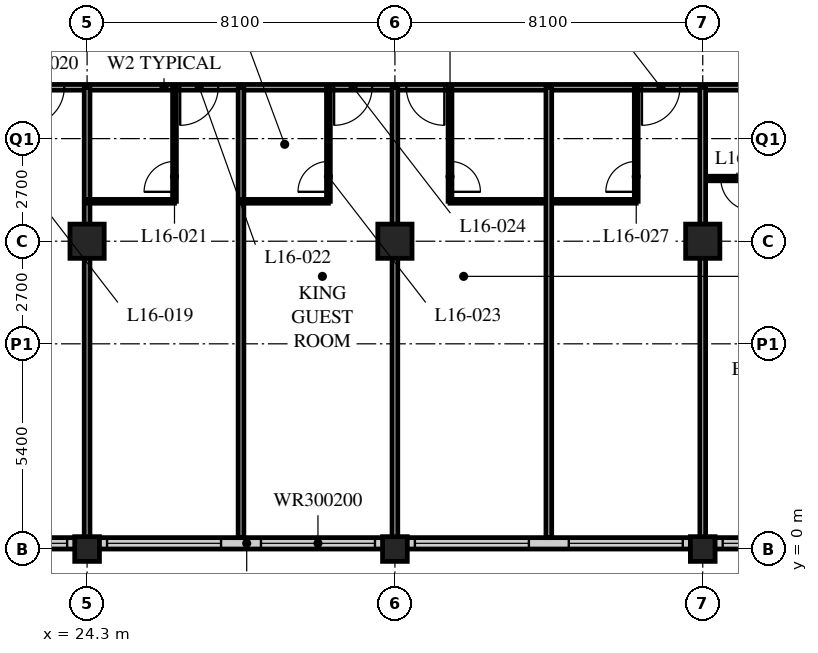
"""IFC4 building model, lengths in metres.
Left out: names, types, materials, properties, quantities, classifications, styles, units other than length and angle.
Written with IfcOpenShell. Run it as: python <this file> out.ifc"""

import sys

from ifc_helpers import new_model, si_unit, direction, frame, frame_2d, origin, origin_2d, place, context, subcontext, project, spatial, rectangle, hollow_rectangle, extrude, element, fill, save


model = new_model("IFC4")
c1 = context("Model", 3, precision=1e-05, world=origin(), true_north=direction((0.0, 1.0)))
c2 = subcontext(c1, "Body", "Model", "MODEL_VIEW")
j1 = project(units=[si_unit("LENGTHUNIT", "METRE"), si_unit("PLANEANGLEUNIT", "RADIAN")], contexts=[c1])
p1 = place(None, origin())
s1 = spatial("IfcSite", under=j1, at=p1, CompositionType="ELEMENT")
p2 = place(p1, origin())
s2 = spatial("IfcBuilding", under=s1, at=p2, CompositionType="ELEMENT")
p3 = place(p2, frame((0.0, 0.0, 67.0)))
s3 = spatial("IfcBuildingStorey", under=s2, at=p3, CompositionType="ELEMENT", Elevation=67.0)
p4 = place(p3, frame((24.3, 0.0, 0.0), z_axis=(0.0, 0.0, 1.0), x_axis=(1.0, 0.0, 0.0)))
e1 = element("IfcColumn", 1, at=p4, inside=s3, PredefinedType="COLUMN", context=c2, shape_type="SweptSolid", body=[
    extrude(hollow_rectangle(XDim=0.65, YDim=0.65, WallThickness=0.05, at=origin_2d()), origin(), (0.0, 0.0, 1.0), 3.4),
])
p5 = place(p3, frame((24.3, 8.1, 0.0), z_axis=(0.0, 0.0, 1.0), x_axis=(1.0, 0.0, 0.0)))
e2 = element("IfcColumn", 2, at=p5, inside=s3, PredefinedType="COLUMN", context=c2, shape_type="SweptSolid", body=[
    extrude(hollow_rectangle(XDim=0.9, YDim=0.9, WallThickness=0.09, at=origin_2d()), origin(), (0.0, 0.0, 1.0), 3.4),
])
p6 = place(p3, frame((32.4, 0.0, 0.0), z_axis=(0.0, 0.0, 1.0), x_axis=(1.0, 0.0, 0.0)))
e3 = element("IfcColumn", 3, at=p6, inside=s3, PredefinedType="COLUMN", context=c2, shape_type="SweptSolid", body=[
    extrude(hollow_rectangle(XDim=0.65, YDim=0.65, WallThickness=0.05, at=origin_2d()), origin(), (0.0, 0.0, 1.0), 3.4),
])
p7 = place(p3, frame((32.4, 8.1, 0.0), z_axis=(0.0, 0.0, 1.0), x_axis=(1.0, 0.0, 0.0)))
e4 = element("IfcColumn", 4, at=p7, inside=s3, PredefinedType="COLUMN", context=c2, shape_type="SweptSolid", body=[
    extrude(hollow_rectangle(XDim=0.9, YDim=0.9, WallThickness=0.09, at=origin_2d()), origin(), (0.0, 0.0, 1.0), 3.4),
])
p8 = place(p3, frame((40.5, 0.0, 0.0), z_axis=(0.0, 0.0, 1.0), x_axis=(1.0, 0.0, 0.0)))
e5 = element("IfcColumn", 5, at=p8, inside=s3, PredefinedType="COLUMN", context=c2, shape_type="SweptSolid", body=[
    extrude(hollow_rectangle(XDim=0.65, YDim=0.65, WallThickness=0.05, at=origin_2d()), origin(), (0.0, 0.0, 1.0), 3.4),
])
p9 = place(p3, frame((40.5, 8.1, 0.0), z_axis=(0.0, 0.0, 1.0), x_axis=(1.0, 0.0, 0.0)))
e6 = element("IfcColumn", 6, at=p9, inside=s3, PredefinedType="COLUMN", context=c2, shape_type="SweptSolid", body=[
    extrude(hollow_rectangle(XDim=0.9, YDim=0.9, WallThickness=0.09, at=origin_2d()), origin(), (0.0, 0.0, 1.0), 3.4),
])
p10 = place(p3, frame((8.4, 0.15, 0.0), z_axis=(0.0, 0.0, 1.0), x_axis=(1.0, 0.0, 0.0)))
e7 = element("IfcWall", 7, at=p10, inside=s3, PredefinedType="SOLIDWALL", context=c2, shape_type="SweptSolid", body=[
    extrude(rectangle(XDim=40.2, YDim=0.3, at=frame_2d((20.1, 0.0))), origin(), (0.0, 0.0, 1.0), 3.19),
])
p11 = place(p10, frame((0.225, 0.0, 0.9)))
e8 = element("IfcOpeningElement", 8, at=p11, cuts=e7, PredefinedType="OPENING", context=c2, shape_type="SweptSolid", body=[
    extrude(rectangle(XDim=3.0, YDim=2.0, at=frame_2d((1.5, 1.0))), frame((0.0, 0.16, 0.0), z_axis=(0.0, -1.0, 0.0), x_axis=(1.0, 0.0, 0.0)), (0.0, 0.0, 1.0), 0.32),
])
p12 = place(p10, frame((4.275, 0.0, 0.9)))
e9 = element("IfcOpeningElement", 9, at=p12, cuts=e7, PredefinedType="OPENING", context=c2, shape_type="SweptSolid", body=[
    extrude(rectangle(XDim=3.0, YDim=2.0, at=frame_2d((1.5, 1.0))), frame((0.0, 0.16, 0.0), z_axis=(0.0, -1.0, 0.0), x_axis=(1.0, 0.0, 0.0)), (0.0, 0.0, 1.0), 0.32),
])
p13 = place(p10, frame((8.325, 0.0, 0.9)))
e10 = element("IfcOpeningElement", 10, at=p13, cuts=e7, PredefinedType="OPENING", context=c2, shape_type="SweptSolid", body=[
    extrude(rectangle(XDim=3.0, YDim=2.0, at=frame_2d((1.5, 1.0))), frame((0.0, 0.16, 0.0), z_axis=(0.0, -1.0, 0.0), x_axis=(1.0, 0.0, 0.0)), (0.0, 0.0, 1.0), 0.32),
])
p14 = place(p10, frame((12.375, 0.0, 0.9)))
e11 = element("IfcOpeningElement", 11, at=p14, cuts=e7, PredefinedType="OPENING", context=c2, shape_type="SweptSolid", body=[
    extrude(rectangle(XDim=3.0, YDim=2.0, at=frame_2d((1.5, 1.0))), frame((0.0, 0.16, 0.0), z_axis=(0.0, -1.0, 0.0), x_axis=(1.0, 0.0, 0.0)), (0.0, 0.0, 1.0), 0.32),
])
p15 = place(p10, frame((16.425, 0.0, 0.9)))
e12 = element("IfcOpeningElement", 12, at=p15, cuts=e7, PredefinedType="OPENING", context=c2, shape_type="SweptSolid", body=[
    extrude(rectangle(XDim=3.0, YDim=2.0, at=frame_2d((1.5, 1.0))), frame((0.0, 0.16, 0.0), z_axis=(0.0, -1.0, 0.0), x_axis=(1.0, 0.0, 0.0)), (0.0, 0.0, 1.0), 0.32),
])
p16 = place(p10, frame((20.475, 0.0, 0.9)))
e13 = element("IfcOpeningElement", 13, at=p16, cuts=e7, PredefinedType="OPENING", context=c2, shape_type="SweptSolid", body=[
    extrude(rectangle(XDim=3.0, YDim=2.0, at=frame_2d((1.5, 1.0))), frame((0.0, 0.16, 0.0), z_axis=(0.0, -1.0, 0.0), x_axis=(1.0, 0.0, 0.0)), (0.0, 0.0, 1.0), 0.32),
])
p17 = place(p10, frame((24.525, 0.0, 0.9)))
e14 = element("IfcOpeningElement", 14, at=p17, cuts=e7, PredefinedType="OPENING", context=c2, shape_type="SweptSolid", body=[
    extrude(rectangle(XDim=3.0, YDim=2.0, at=frame_2d((1.5, 1.0))), frame((0.0, 0.16, 0.0), z_axis=(0.0, -1.0, 0.0), x_axis=(1.0, 0.0, 0.0)), (0.0, 0.0, 1.0), 0.32),
])
p18 = place(p10, frame((28.575, 0.0, 0.9)))
e15 = element("IfcOpeningElement", 15, at=p18, cuts=e7, PredefinedType="OPENING", context=c2, shape_type="SweptSolid", body=[
    extrude(rectangle(XDim=3.0, YDim=2.0, at=frame_2d((1.5, 1.0))), frame((0.0, 0.16, 0.0), z_axis=(0.0, -1.0, 0.0), x_axis=(1.0, 0.0, 0.0)), (0.0, 0.0, 1.0), 0.32),
])
p19 = place(p10, frame((32.625, 0.0, 0.9)))
e16 = element("IfcOpeningElement", 16, at=p19, cuts=e7, PredefinedType="OPENING", context=c2, shape_type="SweptSolid", body=[
    extrude(rectangle(XDim=3.0, YDim=2.0, at=frame_2d((1.5, 1.0))), frame((0.0, 0.16, 0.0), z_axis=(0.0, -1.0, 0.0), x_axis=(1.0, 0.0, 0.0)), (0.0, 0.0, 1.0), 0.32),
])
p20 = place(p10, frame((36.675, 0.0, 0.9)))
e17 = element("IfcOpeningElement", 17, at=p20, cuts=e7, PredefinedType="OPENING", context=c2, shape_type="SweptSolid", body=[
    extrude(rectangle(XDim=3.0, YDim=2.0, at=frame_2d((1.5, 1.0))), frame((0.0, 0.16, 0.0), z_axis=(0.0, -1.0, 0.0), x_axis=(1.0, 0.0, 0.0)), (0.0, 0.0, 1.0), 0.32),
])
p21 = place(p3, frame((8.1, 12.15, 0.0), z_axis=(0.0, 0.0, 1.0), x_axis=(1.0, 0.0, 0.0)))
e18 = element("IfcWall", 18, at=p21, inside=s3, PredefinedType="PARTITIONING", context=c2, shape_type="SweptSolid", body=[
    extrude(rectangle(XDim=36.45, YDim=0.15, at=frame_2d((18.225, 0.0))), origin(), (0.0, 0.0, 1.0), 3.19),
])
p22 = place(p21, frame((4.35, 0.0, 0.0)))
e19 = element("IfcOpeningElement", 19, at=p22, cuts=e18, PredefinedType="OPENING", context=c2, shape_type="SweptSolid", body=[
    extrude(rectangle(XDim=1.0, YDim=2.1, at=frame_2d((0.5, 1.05))), frame((0.0, 0.085, 0.0), z_axis=(0.0, -1.0, 0.0), x_axis=(1.0, 0.0, 0.0)), (0.0, 0.0, 1.0), 0.17),
])
p23 = place(p21, frame((10.55, 0.0, 0.0)))
e20 = element("IfcOpeningElement", 20, at=p23, cuts=e18, PredefinedType="OPENING", context=c2, shape_type="SweptSolid", body=[
    extrude(rectangle(XDim=1.0, YDim=2.1, at=frame_2d((0.5, 1.05))), frame((0.0, 0.085, 0.0), z_axis=(0.0, -1.0, 0.0), x_axis=(1.0, 0.0, 0.0)), (0.0, 0.0, 1.0), 0.17),
])
p24 = place(p21, frame((14.6, 0.0, 0.0)))
e21 = element("IfcOpeningElement", 21, at=p24, cuts=e18, PredefinedType="OPENING", context=c2, shape_type="SweptSolid", body=[
    extrude(rectangle(XDim=1.0, YDim=2.1, at=frame_2d((0.5, 1.05))), frame((0.0, 0.085, 0.0), z_axis=(0.0, -1.0, 0.0), x_axis=(1.0, 0.0, 0.0)), (0.0, 0.0, 1.0), 0.17),
])
p25 = place(p21, frame((18.65, 0.0, 0.0)))
e22 = element("IfcOpeningElement", 22, at=p25, cuts=e18, PredefinedType="OPENING", context=c2, shape_type="SweptSolid", body=[
    extrude(rectangle(XDim=1.0, YDim=2.1, at=frame_2d((0.5, 1.05))), frame((0.0, 0.085, 0.0), z_axis=(0.0, -1.0, 0.0), x_axis=(1.0, 0.0, 0.0)), (0.0, 0.0, 1.0), 0.17),
])
p26 = place(p21, frame((22.7, 0.0, 0.0)))
e23 = element("IfcOpeningElement", 23, at=p26, cuts=e18, PredefinedType="OPENING", context=c2, shape_type="SweptSolid", body=[
    extrude(rectangle(XDim=1.0, YDim=2.1, at=frame_2d((0.5, 1.05))), frame((0.0, 0.085, 0.0), z_axis=(0.0, -1.0, 0.0), x_axis=(1.0, 0.0, 0.0)), (0.0, 0.0, 1.0), 0.17),
])
p27 = place(p21, frame((24.6, 0.0, 0.0)))
e24 = element("IfcOpeningElement", 24, at=p27, cuts=e18, PredefinedType="OPENING", context=c2, shape_type="SweptSolid", body=[
    extrude(rectangle(XDim=1.0, YDim=2.1, at=frame_2d((0.5, 1.05))), frame((0.0, 0.085, 0.0), z_axis=(0.0, -1.0, 0.0), x_axis=(1.0, 0.0, 0.0)), (0.0, 0.0, 1.0), 0.17),
])
p28 = place(p21, frame((30.8, 0.0, 0.0)))
e25 = element("IfcOpeningElement", 25, at=p28, cuts=e18, PredefinedType="OPENING", context=c2, shape_type="SweptSolid", body=[
    extrude(rectangle(XDim=1.0, YDim=2.1, at=frame_2d((0.5, 1.05))), frame((0.0, 0.085, 0.0), z_axis=(0.0, -1.0, 0.0), x_axis=(1.0, 0.0, 0.0)), (0.0, 0.0, 1.0), 0.17),
])
p29 = place(p21, frame((1.525, 0.0, 0.0)))
e26 = element("IfcOpeningElement", 26, at=p29, cuts=e18, PredefinedType="OPENING", context=c2, shape_type="SweptSolid", body=[
    extrude(rectangle(XDim=1.0, YDim=2.1, at=frame_2d((0.5, 1.05))), frame((0.0, 0.085, 0.0), z_axis=(0.0, -1.0, 0.0), x_axis=(1.0, 0.0, 0.0)), (0.0, 0.0, 1.0), 0.17),
])
p30 = place(p21, frame((33.925, 0.0, 0.0)))
e27 = element("IfcOpeningElement", 27, at=p30, cuts=e18, PredefinedType="OPENING", context=c2, shape_type="SweptSolid", body=[
    extrude(rectangle(XDim=1.0, YDim=2.1, at=frame_2d((0.5, 1.05))), frame((0.0, 0.085, 0.0), z_axis=(0.0, -1.0, 0.0), x_axis=(1.0, 0.0, 0.0)), (0.0, 0.0, 1.0), 0.17),
])
p31 = place(p3, frame((24.3, 12.15, 0.0), z_axis=(0.0, 0.0, 1.0), x_axis=(0.0, -1.0, 0.0)))
e28 = element("IfcWall", 28, at=p31, inside=s3, PredefinedType="PARTITIONING", context=c2, shape_type="SweptSolid", body=[
    extrude(rectangle(XDim=11.85, YDim=0.15, at=frame_2d((5.925, 0.0))), origin(), (0.0, 0.0, 1.0), 2.578),
])
p32 = place(p3, frame((24.3, 9.15, 0.0), z_axis=(0.0, 0.0, 1.0), x_axis=(1.0, 0.0, 0.0)))
e29 = element("IfcWall", 29, at=p32, inside=s3, PredefinedType="PARTITIONING", context=c2, shape_type="SweptSolid", body=[
    extrude(rectangle(XDim=2.3, YDim=0.1, at=frame_2d((1.15, 0.0))), origin(), (0.0, 0.0, 1.0), 3.19),
])
p33 = place(p3, frame((26.6, 12.15, 0.0), z_axis=(0.0, 0.0, 1.0), x_axis=(0.0, -1.0, 0.0)))
e30 = element("IfcWall", 30, at=p33, inside=s3, PredefinedType="PARTITIONING", context=c2, shape_type="SweptSolid", body=[
    extrude(rectangle(XDim=3.0, YDim=0.1, at=frame_2d((1.5, 0.0))), origin(), (0.0, 0.0, 1.0), 3.19),
])
p34 = place(p33, frame((1.95, 0.0, 0.0)))
e31 = element("IfcOpeningElement", 31, at=p34, cuts=e30, PredefinedType="OPENING", context=c2, shape_type="SweptSolid", body=[
    extrude(rectangle(XDim=0.8, YDim=2.1, at=frame_2d((0.4, 1.05))), frame((0.0, 0.06, 0.0), z_axis=(0.0, -1.0, 0.0), x_axis=(1.0, 0.0, 0.0)), (0.0, 0.0, 1.0), 0.12),
])
p35 = place(p3, frame((28.35, 12.15, 0.0), z_axis=(0.0, 0.0, 1.0), x_axis=(0.0, -1.0, 0.0)))
e32 = element("IfcWall", 32, at=p35, inside=s3, PredefinedType="PARTITIONING", context=c2, shape_type="SweptSolid", body=[
    extrude(rectangle(XDim=11.85, YDim=0.15, at=frame_2d((5.925, 0.0))), origin(), (0.0, 0.0, 1.0), 3.19),
])
p36 = place(p3, frame((28.35, 9.15, 0.0), z_axis=(0.0, 0.0, 1.0), x_axis=(1.0, 0.0, 0.0)))
e33 = element("IfcWall", 33, at=p36, inside=s3, PredefinedType="PARTITIONING", context=c2, shape_type="SweptSolid", body=[
    extrude(rectangle(XDim=2.3, YDim=0.1, at=frame_2d((1.15, 0.0))), origin(), (0.0, 0.0, 1.0), 3.19),
])
p37 = place(p3, frame((30.65, 12.15, 0.0), z_axis=(0.0, 0.0, 1.0), x_axis=(0.0, -1.0, 0.0)))
e34 = element("IfcWall", 34, at=p37, inside=s3, PredefinedType="PARTITIONING", context=c2, shape_type="SweptSolid", body=[
    extrude(rectangle(XDim=3.0, YDim=0.1, at=frame_2d((1.5, 0.0))), origin(), (0.0, 0.0, 1.0), 3.19),
])
p38 = place(p37, frame((1.95, 0.0, 0.0)))
e35 = element("IfcOpeningElement", 35, at=p38, cuts=e34, PredefinedType="OPENING", context=c2, shape_type="SweptSolid", body=[
    extrude(rectangle(XDim=0.8, YDim=2.1, at=frame_2d((0.4, 1.05))), frame((0.0, 0.06, 0.0), z_axis=(0.0, -1.0, 0.0), x_axis=(1.0, 0.0, 0.0)), (0.0, 0.0, 1.0), 0.12),
])
p39 = place(p3, frame((32.4, 12.15, 0.0), z_axis=(0.0, 0.0, 1.0), x_axis=(0.0, -1.0, 0.0)))
e36 = element("IfcWall", 36, at=p39, inside=s3, PredefinedType="PARTITIONING", context=c2, shape_type="SweptSolid", body=[
    extrude(rectangle(XDim=11.85, YDim=0.15, at=frame_2d((5.925, 0.0))), origin(), (0.0, 0.0, 1.0), 2.578),
])
p40 = place(p3, frame((33.85, 9.15, 0.0), z_axis=(0.0, 0.0, 1.0), x_axis=(1.0, 0.0, 0.0)))
e37 = element("IfcWall", 37, at=p40, inside=s3, PredefinedType="PARTITIONING", context=c2, shape_type="SweptSolid", body=[
    extrude(rectangle(XDim=4.9, YDim=0.1, at=frame_2d((2.45, 0.0))), origin(), (0.0, 0.0, 1.0), 3.19),
])
p41 = place(p3, frame((33.85, 12.15, 0.0), z_axis=(0.0, 0.0, 1.0), x_axis=(0.0, -1.0, 0.0)))
e38 = element("IfcWall", 38, at=p41, inside=s3, PredefinedType="PARTITIONING", context=c2, shape_type="SweptSolid", body=[
    extrude(rectangle(XDim=3.0, YDim=0.1, at=frame_2d((1.5, 0.0))), origin(), (0.0, 0.0, 1.0), 3.19),
])
p42 = place(p41, frame((1.95, 0.0, 0.0)))
e39 = element("IfcOpeningElement", 39, at=p42, cuts=e38, PredefinedType="OPENING", context=c2, shape_type="SweptSolid", body=[
    extrude(rectangle(XDim=0.8, YDim=2.1, at=frame_2d((0.4, 1.05))), frame((0.0, 0.06, 0.0), z_axis=(0.0, -1.0, 0.0), x_axis=(1.0, 0.0, 0.0)), (0.0, 0.0, 1.0), 0.12),
])
p43 = place(p3, frame((36.45, 12.15, 0.0), z_axis=(0.0, 0.0, 1.0), x_axis=(0.0, -1.0, 0.0)))
e40 = element("IfcWall", 40, at=p43, inside=s3, PredefinedType="PARTITIONING", context=c2, shape_type="SweptSolid", body=[
    extrude(rectangle(XDim=11.85, YDim=0.15, at=frame_2d((5.925, 0.0))), origin(), (0.0, 0.0, 1.0), 3.19),
])
p44 = place(p3, frame((38.75, 12.15, 0.0), z_axis=(0.0, 0.0, 1.0), x_axis=(0.0, -1.0, 0.0)))
e41 = element("IfcWall", 41, at=p44, inside=s3, PredefinedType="PARTITIONING", context=c2, shape_type="SweptSolid", body=[
    extrude(rectangle(XDim=3.0, YDim=0.1, at=frame_2d((1.5, 0.0))), origin(), (0.0, 0.0, 1.0), 3.19),
])
p45 = place(p44, frame((1.95, 0.0, 0.0)))
e42 = element("IfcOpeningElement", 42, at=p45, cuts=e41, PredefinedType="OPENING", context=c2, shape_type="SweptSolid", body=[
    extrude(rectangle(XDim=0.8, YDim=2.1, at=frame_2d((0.4, 1.05))), frame((0.0, 0.06, 0.0), z_axis=(0.0, -1.0, 0.0), x_axis=(1.0, 0.0, 0.0)), (0.0, 0.0, 1.0), 0.12),
])
p46 = place(p3, frame((40.5, 9.75, 0.0), z_axis=(0.0, 0.0, 1.0), x_axis=(1.0, 0.0, 0.0)))
e43 = element("IfcWall", 43, at=p46, inside=s3, PredefinedType="PARTITIONING", context=c2, shape_type="SweptSolid", body=[
    extrude(rectangle(XDim=8.05, YDim=0.12, at=frame_2d((4.025, 0.0))), origin(), (0.0, 0.0, 1.0), 3.19),
])
p47 = place(p46, frame((0.475, 0.0, 0.0)))
e44 = element("IfcOpeningElement", 44, at=p47, cuts=e43, PredefinedType="OPENING", context=c2, shape_type="SweptSolid", body=[
    extrude(rectangle(XDim=0.85, YDim=2.1, at=frame_2d((0.425, 1.05))), frame((0.0, 0.07, 0.0), z_axis=(0.0, -1.0, 0.0), x_axis=(1.0, 0.0, 0.0)), (0.0, 0.0, 1.0), 0.14),
])
p48 = place(p46, frame((4.325, 0.0, 0.0)))
e45 = element("IfcOpeningElement", 45, at=p48, cuts=e43, PredefinedType="OPENING", context=c2, shape_type="SweptSolid", body=[
    extrude(rectangle(XDim=0.85, YDim=2.1, at=frame_2d((0.425, 1.05))), frame((0.0, 0.07, 0.0), z_axis=(0.0, -1.0, 0.0), x_axis=(1.0, 0.0, 0.0)), (0.0, 0.0, 1.0), 0.14),
])
p49 = place(p3, frame((40.5, 12.15, 0.0), z_axis=(0.0, 0.0, 1.0), x_axis=(0.0, -1.0, 0.0)))
e46 = element("IfcWall", 46, at=p49, inside=s3, PredefinedType="PARTITIONING", context=c2, shape_type="SweptSolid", body=[
    extrude(rectangle(XDim=11.85, YDim=0.15, at=frame_2d((5.925, 0.0))), origin(), (0.0, 0.0, 1.0), 2.578),
])
p50 = place(p14, origin())
e47 = element("IfcWindow", 47, at=p50, inside=s3, PartitioningType="SINGLE_PANEL", PredefinedType="WINDOW", context=c2, shape_type="SweptSolid", body=[
    extrude(rectangle(XDim=3.0, YDim=2.0, at=frame_2d((1.5, 1.0))), frame((0.0, 0.03, 0.0), z_axis=(0.0, -1.0, 0.0), x_axis=(1.0, 0.0, 0.0)), (0.0, 0.0, 1.0), 0.06),
])
fill(e11, e47)
p51 = place(p15, origin())
e48 = element("IfcWindow", 48, at=p51, inside=s3, PartitioningType="SINGLE_PANEL", PredefinedType="WINDOW", context=c2, shape_type="SweptSolid", body=[
    extrude(rectangle(XDim=3.0, YDim=2.0, at=frame_2d((1.5, 1.0))), frame((0.0, 0.03, 0.0), z_axis=(0.0, -1.0, 0.0), x_axis=(1.0, 0.0, 0.0)), (0.0, 0.0, 1.0), 0.06),
])
fill(e12, e48)
p52 = place(p16, origin())
e49 = element("IfcWindow", 49, at=p52, inside=s3, PartitioningType="SINGLE_PANEL", PredefinedType="WINDOW", context=c2, shape_type="SweptSolid", body=[
    extrude(rectangle(XDim=3.0, YDim=2.0, at=frame_2d((1.5, 1.0))), frame((0.0, 0.03, 0.0), z_axis=(0.0, -1.0, 0.0), x_axis=(1.0, 0.0, 0.0)), (0.0, 0.0, 1.0), 0.06),
])
fill(e13, e49)
p53 = place(p17, origin())
e50 = element("IfcWindow", 50, at=p53, inside=s3, PartitioningType="SINGLE_PANEL", PredefinedType="WINDOW", context=c2, shape_type="SweptSolid", body=[
    extrude(rectangle(XDim=3.0, YDim=2.0, at=frame_2d((1.5, 1.0))), frame((0.0, 0.03, 0.0), z_axis=(0.0, -1.0, 0.0), x_axis=(1.0, 0.0, 0.0)), (0.0, 0.0, 1.0), 0.06),
])
fill(e14, e50)
p54 = place(p18, origin())
e51 = element("IfcWindow", 51, at=p54, inside=s3, PartitioningType="SINGLE_PANEL", PredefinedType="WINDOW", context=c2, shape_type="SweptSolid", body=[
    extrude(rectangle(XDim=3.0, YDim=2.0, at=frame_2d((1.5, 1.0))), frame((0.0, 0.03, 0.0), z_axis=(0.0, -1.0, 0.0), x_axis=(1.0, 0.0, 0.0)), (0.0, 0.0, 1.0), 0.06),
])
fill(e15, e51)
p55 = place(p19, origin())
e52 = element("IfcWindow", 52, at=p55, inside=s3, PartitioningType="SINGLE_PANEL", PredefinedType="WINDOW", context=c2, shape_type="SweptSolid", body=[
    extrude(rectangle(XDim=3.0, YDim=2.0, at=frame_2d((1.5, 1.0))), frame((0.0, 0.03, 0.0), z_axis=(0.0, -1.0, 0.0), x_axis=(1.0, 0.0, 0.0)), (0.0, 0.0, 1.0), 0.06),
])
fill(e16, e52)
p56 = place(p24, origin())
e53 = element("IfcDoor", 53, at=p56, inside=s3, OperationType="SINGLE_SWING_RIGHT", PredefinedType="DOOR", context=c2, shape_type="SweptSolid", body=[
    extrude(rectangle(XDim=1.0, YDim=2.1, at=frame_2d((0.5, 1.05))), frame((0.0, 0.025, 0.0), z_axis=(0.0, -1.0, 0.0), x_axis=(1.0, 0.0, 0.0)), (0.0, 0.0, 1.0), 0.05),
])
fill(e21, e53)
p57 = place(p34, origin())
e54 = element("IfcDoor", 54, at=p57, inside=s3, OperationType="SINGLE_SWING_LEFT", PredefinedType="DOOR", context=c2, shape_type="SweptSolid", body=[
    extrude(rectangle(XDim=0.8, YDim=2.1, at=frame_2d((0.4, 1.05))), frame((0.0, 0.025, 0.0), z_axis=(0.0, -1.0, 0.0), x_axis=(1.0, 0.0, 0.0)), (0.0, 0.0, 1.0), 0.05),
])
fill(e31, e54)
p58 = place(p25, origin())
e55 = element("IfcDoor", 55, at=p58, inside=s3, OperationType="SINGLE_SWING_RIGHT", PredefinedType="DOOR", context=c2, shape_type="SweptSolid", body=[
    extrude(rectangle(XDim=1.0, YDim=2.1, at=frame_2d((0.5, 1.05))), frame((0.0, 0.025, 0.0), z_axis=(0.0, -1.0, 0.0), x_axis=(1.0, 0.0, 0.0)), (0.0, 0.0, 1.0), 0.05),
])
fill(e22, e55)
p59 = place(p38, origin())
e56 = element("IfcDoor", 56, at=p59, inside=s3, OperationType="SINGLE_SWING_LEFT", PredefinedType="DOOR", context=c2, shape_type="SweptSolid", body=[
    extrude(rectangle(XDim=0.8, YDim=2.1, at=frame_2d((0.4, 1.05))), frame((0.0, 0.025, 0.0), z_axis=(0.0, -1.0, 0.0), x_axis=(1.0, 0.0, 0.0)), (0.0, 0.0, 1.0), 0.05),
])
fill(e35, e56)
p60 = place(p26, origin())
e57 = element("IfcDoor", 57, at=p60, inside=s3, OperationType="SINGLE_SWING_RIGHT", PredefinedType="DOOR", context=c2, shape_type="SweptSolid", body=[
    extrude(rectangle(XDim=1.0, YDim=2.1, at=frame_2d((0.5, 1.05))), frame((0.0, 0.025, 0.0), z_axis=(0.0, -1.0, 0.0), x_axis=(1.0, 0.0, 0.0)), (0.0, 0.0, 1.0), 0.05),
])
fill(e23, e57)
p61 = place(p42, origin())
e58 = element("IfcDoor", 58, at=p61, inside=s3, OperationType="SINGLE_SWING_RIGHT", PredefinedType="DOOR", context=c2, shape_type="SweptSolid", body=[
    extrude(rectangle(XDim=0.8, YDim=2.1, at=frame_2d((0.4, 1.05))), frame((0.0, 0.025, 0.0), z_axis=(0.0, -1.0, 0.0), x_axis=(1.0, 0.0, 0.0)), (0.0, 0.0, 1.0), 0.05),
])
fill(e39, e58)
p62 = place(p27, origin())
e59 = element("IfcDoor", 59, at=p62, inside=s3, OperationType="SINGLE_SWING_LEFT", PredefinedType="DOOR", context=c2, shape_type="SweptSolid", body=[
    extrude(rectangle(XDim=1.0, YDim=2.1, at=frame_2d((0.5, 1.05))), frame((0.0, 0.025, 0.0), z_axis=(0.0, -1.0, 0.0), x_axis=(1.0, 0.0, 0.0)), (0.0, 0.0, 1.0), 0.05),
])
fill(e24, e59)
p63 = place(p45, origin())
e60 = element("IfcDoor", 60, at=p63, inside=s3, OperationType="SINGLE_SWING_LEFT", PredefinedType="DOOR", context=c2, shape_type="SweptSolid", body=[
    extrude(rectangle(XDim=0.8, YDim=2.1, at=frame_2d((0.4, 1.05))), frame((0.0, 0.025, 0.0), z_axis=(0.0, -1.0, 0.0), x_axis=(1.0, 0.0, 0.0)), (0.0, 0.0, 1.0), 0.05),
])
fill(e42, e60)
p64 = place(p28, origin())
e61 = element("IfcDoor", 61, at=p64, inside=s3, OperationType="SINGLE_SWING_RIGHT", PredefinedType="DOOR", context=c2, shape_type="SweptSolid", body=[
    extrude(rectangle(XDim=1.0, YDim=2.1, at=frame_2d((0.5, 1.05))), frame((0.0, 0.025, 0.0), z_axis=(0.0, -1.0, 0.0), x_axis=(1.0, 0.0, 0.0)), (0.0, 0.0, 1.0), 0.05),
])
fill(e25, e61)
p65 = place(p47, origin())
e62 = element("IfcDoor", 62, at=p65, inside=s3, OperationType="SINGLE_SWING_LEFT", PredefinedType="DOOR", context=c2, shape_type="SweptSolid", body=[
    extrude(rectangle(XDim=0.85, YDim=2.1, at=frame_2d((0.425, 1.05))), frame((0.0, 0.025, 0.0), z_axis=(0.0, -1.0, 0.0), x_axis=(1.0, 0.0, 0.0)), (0.0, 0.0, 1.0), 0.05),
])
fill(e44, e62)
save(model, sys.argv[1])
